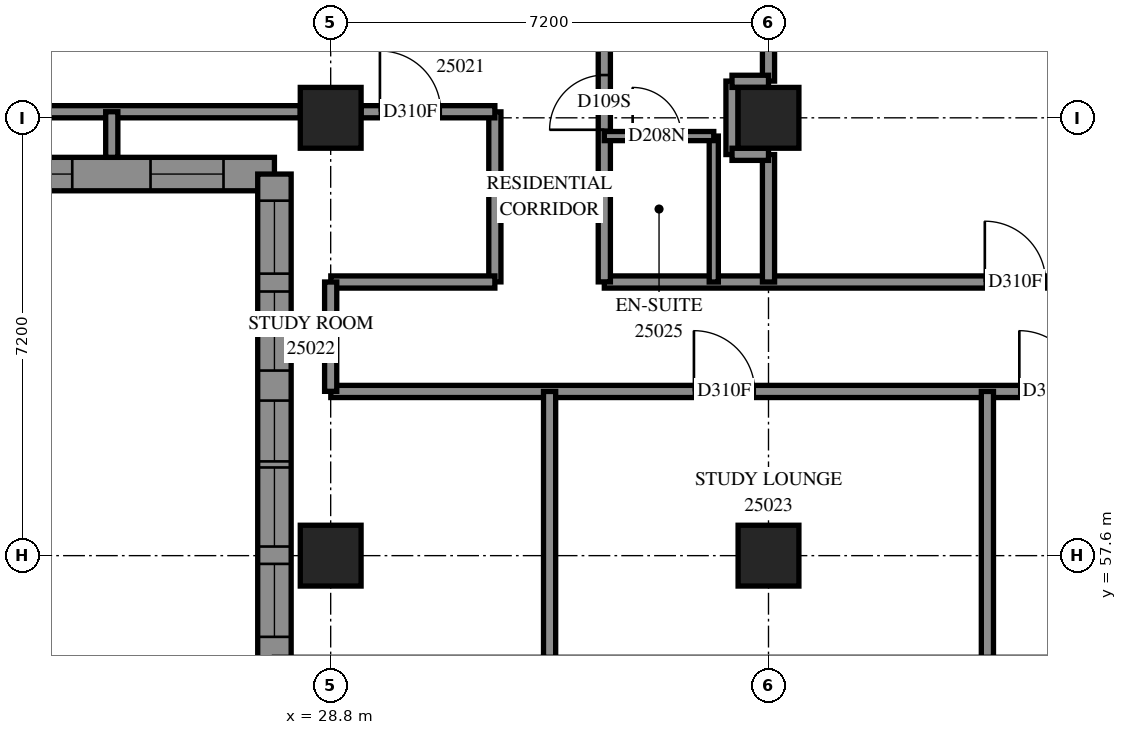
"""IFC4 building model, lengths in metres.
Left out: names, types, materials, properties, quantities, classifications, styles, units other than length and angle.
Written with IfcOpenShell. Run it as: python <this file> out.ifc"""

import sys

from ifc_helpers import new_model, si_unit, direction, frame, frame_2d, origin, origin_2d, place, context, subcontext, project, spatial, polyline, rectangle, outline, extrude, element, fill, save


model = new_model("IFC4")
c1 = context("Model", 3, precision=1e-05, world=origin(), true_north=direction((0.0, 1.0)))
c2 = subcontext(c1, "Body", "Model", "MODEL_VIEW")
j1 = project(units=[si_unit("LENGTHUNIT", "METRE"), si_unit("PLANEANGLEUNIT", "RADIAN")], contexts=[c1])
p1 = place(None, origin())
s1 = spatial("IfcSite", under=j1, at=p1, CompositionType="ELEMENT")
p2 = place(p1, origin())
s2 = spatial("IfcBuilding", under=s1, at=p2, CompositionType="ELEMENT")
p3 = place(p2, frame((0.0, 0.0, 94.8)))
s3 = spatial("IfcBuildingStorey", under=s2, at=p3, CompositionType="ELEMENT", Elevation=94.8)
for number, where, z_axis, x_axis in (
    (1, (28.8, 57.6, 0.0), (0.0, 0.0, 1.0), (1.0, 0.0, 0.0)),
    (2, (28.8, 64.8, 0.0), (0.0, 0.0, 1.0), (1.0, 0.0, 0.0)),
    (3, (36.0, 57.6, 0.0), (0.0, 0.0, 1.0), (1.0, 0.0, 0.0)),
    (4, (36.0, 64.8, 0.0), (0.0, 0.0, 1.0), (1.0, 0.0, 0.0)),
):
    element("IfcColumn", number, at=place(p3, frame(where, z_axis=z_axis, x_axis=x_axis)), inside=s3, PredefinedType="COLUMN", context=c2, shape_type="SweptSolid", body=[
        extrude(rectangle(XDim=1.0, YDim=1.0, at=origin_2d()), origin(), (0.0, 0.0, 1.0), 3.1),
    ])
p4 = place(p3, frame((19.654, 63.875, 0.0), z_axis=(0.0, 0.0, 1.0), x_axis=(1.0, 0.0, 0.0)))
e5 = element("IfcWall", 5, at=p4, inside=s3, PredefinedType="SOLIDWALL", context=c2, shape_type="SweptSolid", body=[
    extrude(outline(polyline([(-0.275, -0.275), (7.946, -0.275), (8.496, 0.275), (0.275, 0.275), (-0.275, -0.275)])), origin(), (0.0, 0.0, 1.0), 3.1),
])
p5 = place(p4, frame((2.096, 0.0, 0.5)))
e6 = element("IfcOpeningElement", 6, at=p5, cuts=e5, PredefinedType="OPENING", context=c2, shape_type="SweptSolid", body=[
    extrude(rectangle(XDim=1.3, YDim=2.45, at=frame_2d((0.65, 1.225))), frame((0.0, 0.285, 0.0), z_axis=(0.0, -1.0, 0.0), x_axis=(1.0, 0.0, 0.0)), (0.0, 0.0, 1.0), 0.57),
])
p6 = place(p4, frame((3.596, 0.0, 0.5)))
e7 = element("IfcOpeningElement", 7, at=p6, cuts=e5, PredefinedType="OPENING", context=c2, shape_type="SweptSolid", body=[
    extrude(rectangle(XDim=1.3, YDim=2.45, at=frame_2d((0.65, 1.225))), frame((0.0, 0.285, 0.0), z_axis=(0.0, -1.0, 0.0), x_axis=(1.0, 0.0, 0.0)), (0.0, 0.0, 1.0), 0.57),
])
p7 = place(p4, frame((0.611, 0.0, 0.5)))
e8 = element("IfcOpeningElement", 8, at=p7, cuts=e5, PredefinedType="OPENING", context=c2, shape_type="SweptSolid", body=[
    extrude(rectangle(XDim=1.2, YDim=2.45, at=frame_2d((0.6, 1.225))), frame((0.0, 0.285, 0.0), z_axis=(0.0, -1.0, 0.0), x_axis=(1.0, 0.0, 0.0)), (0.0, 0.0, 1.0), 0.57),
])
p8 = place(p4, frame((6.184, 0.0, 0.5)))
e9 = element("IfcOpeningElement", 9, at=p8, cuts=e5, PredefinedType="OPENING", context=c2, shape_type="SweptSolid", body=[
    extrude(rectangle(XDim=1.2, YDim=2.45, at=frame_2d((0.6, 1.225))), frame((0.0, 0.285, 0.0), z_axis=(0.0, -1.0, 0.0), x_axis=(1.0, 0.0, 0.0)), (0.0, 0.0, 1.0), 0.57),
])
p9 = place(p3, frame((27.875, 63.875, 0.0), z_axis=(0.0, 0.0, 1.0), x_axis=(0.0, -1.0, 0.0)))
e10 = element("IfcWall", 10, at=p9, inside=s3, PredefinedType="SOLIDWALL", context=c2, shape_type="SweptSolid", body=[
    extrude(outline(polyline([(0.275, -0.275), (8.496, -0.275), (7.946, 0.275), (-0.275, 0.275), (0.275, -0.275)])), origin(), (0.0, 0.0, 1.0), 3.1),
])
p10 = place(p9, frame((4.825, 0.0, 0.5)))
e11 = element("IfcOpeningElement", 11, at=p10, cuts=e10, PredefinedType="OPENING", context=c2, shape_type="SweptSolid", body=[
    extrude(rectangle(XDim=1.3, YDim=2.45, at=frame_2d((0.65, 1.225))), frame((0.0, 0.285, 0.0), z_axis=(0.0, -1.0, 0.0), x_axis=(1.0, 0.0, 0.0)), (0.0, 0.0, 1.0), 0.57),
])
p11 = place(p9, frame((0.438, 0.0, 0.5)))
e12 = element("IfcOpeningElement", 12, at=p11, cuts=e10, PredefinedType="OPENING", context=c2, shape_type="SweptSolid", body=[
    extrude(rectangle(XDim=1.2, YDim=2.45, at=frame_2d((0.6, 1.225))), frame((0.0, 0.285, 0.0), z_axis=(0.0, -1.0, 0.0), x_axis=(1.0, 0.0, 0.0)), (0.0, 0.0, 1.0), 0.57),
])
p12 = place(p9, frame((6.41, 0.0, 0.5)))
e13 = element("IfcOpeningElement", 13, at=p12, cuts=e10, PredefinedType="OPENING", context=c2, shape_type="SweptSolid", body=[
    extrude(rectangle(XDim=1.2, YDim=2.45, at=frame_2d((0.6, 1.225))), frame((0.0, 0.285, 0.0), z_axis=(0.0, -1.0, 0.0), x_axis=(1.0, 0.0, 0.0)), (0.0, 0.0, 1.0), 0.57),
])
p13 = place(p9, frame((1.931, 0.0, 0.5)))
e14 = element("IfcOpeningElement", 14, at=p13, cuts=e10, PredefinedType="OPENING", context=c2, shape_type="SweptSolid", body=[
    extrude(rectangle(XDim=1.3, YDim=2.45, at=frame_2d((0.65, 1.225))), frame((0.0, 0.285, 0.0), z_axis=(0.0, -1.0, 0.0), x_axis=(1.0, 0.0, 0.0)), (0.0, 0.0, 1.0), 0.57),
])
p14 = place(p9, frame((3.725, 0.0, 0.45)))
e15 = element("IfcOpeningElement", 15, at=p14, cuts=e10, PredefinedType="OPENING", context=c2, shape_type="SweptSolid", body=[
    extrude(rectangle(XDim=1.0, YDim=2.5, at=frame_2d((0.5, 1.25))), frame((0.0, 0.285, 0.0), z_axis=(0.0, -1.0, 0.0), x_axis=(1.0, 0.0, 0.0)), (0.0, 0.0, 1.0), 0.57),
])
p15 = place(p3, frame((28.802, 60.3, 0.0), z_axis=(0.0, 0.0, 1.0), x_axis=(1.0, 0.0, 0.0)))
e16 = element("IfcWall", 16, at=p15, inside=s3, PredefinedType="PARTITIONING", context=c2, shape_type="SweptSolid", body=[
    extrude(rectangle(XDim=24.298, YDim=0.2, at=frame_2d((12.149, 0.0))), origin(), (0.0, 0.0, 1.0), 3.1),
])
p16 = place(p15, frame((5.972, 0.0, 0.0)))
e17 = element("IfcOpeningElement", 17, at=p16, cuts=e16, PredefinedType="OPENING", context=c2, shape_type="SweptSolid", body=[
    extrude(rectangle(XDim=1.0, YDim=2.1, at=frame_2d((0.5, 1.05))), frame((0.0, 0.11, 0.0), z_axis=(0.0, -1.0, 0.0), x_axis=(1.0, 0.0, 0.0)), (0.0, 0.0, 1.0), 0.22),
])
p17 = place(p15, frame((11.323, 0.0, 0.0)))
e18 = element("IfcOpeningElement", 18, at=p17, cuts=e16, PredefinedType="OPENING", context=c2, shape_type="SweptSolid", body=[
    extrude(rectangle(XDim=1.0, YDim=2.1, at=frame_2d((0.5, 1.05))), frame((0.0, 0.11, 0.0), z_axis=(0.0, -1.0, 0.0), x_axis=(1.0, 0.0, 0.0)), (0.0, 0.0, 1.0), 0.22),
])
p18 = place(p15, frame((14.798, 0.0, 0.0)))
e19 = element("IfcOpeningElement", 19, at=p18, cuts=e16, PredefinedType="OPENING", context=c2, shape_type="SweptSolid", body=[
    extrude(rectangle(XDim=0.9, YDim=2.1, at=frame_2d((0.45, 1.05))), frame((0.0, 0.11, 0.0), z_axis=(0.0, -1.0, 0.0), x_axis=(1.0, 0.0, 0.0)), (0.0, 0.0, 1.0), 0.22),
])
p19 = place(p15, frame((18.833, 0.0, 0.0)))
e20 = element("IfcOpeningElement", 20, at=p19, cuts=e16, PredefinedType="OPENING", context=c2, shape_type="SweptSolid", body=[
    extrude(rectangle(XDim=1.0, YDim=2.1, at=frame_2d((0.5, 1.05))), frame((0.0, 0.11, 0.0), z_axis=(0.0, -1.0, 0.0), x_axis=(1.0, 0.0, 0.0)), (0.0, 0.0, 1.0), 0.22),
])
p20 = place(p15, frame((23.151, 0.0, 0.0)))
e21 = element("IfcOpeningElement", 21, at=p20, cuts=e16, PredefinedType="OPENING", context=c2, shape_type="SweptSolid", body=[
    extrude(rectangle(XDim=1.0, YDim=2.1, at=frame_2d((0.5, 1.05))), frame((0.0, 0.11, 0.0), z_axis=(0.0, -1.0, 0.0), x_axis=(1.0, 0.0, 0.0)), (0.0, 0.0, 1.0), 0.22),
])
p21 = place(p3, frame((33.3, 62.1, 0.0), z_axis=(0.0, 0.0, 1.0), x_axis=(1.0, 0.0, 0.0)))
e22 = element("IfcWall", 22, at=p21, inside=s3, PredefinedType="PARTITIONING", context=c2, shape_type="SweptSolid", body=[
    extrude(rectangle(XDim=17.1, YDim=0.2, at=frame_2d((8.55, 0.0))), origin(), (0.0, 0.0, 1.0), 3.1),
])
p22 = place(p21, frame((6.258, 0.0, 0.0)))
e23 = element("IfcOpeningElement", 23, at=p22, cuts=e22, PredefinedType="OPENING", context=c2, shape_type="SweptSolid", body=[
    extrude(rectangle(XDim=1.0, YDim=2.1, at=frame_2d((0.5, 1.05))), frame((0.0, 0.11, 0.0), z_axis=(0.0, -1.0, 0.0), x_axis=(1.0, 0.0, 0.0)), (0.0, 0.0, 1.0), 0.22),
])
p23 = place(p21, frame((10.148, 0.0, 0.0)))
e24 = element("IfcOpeningElement", 24, at=p23, cuts=e22, PredefinedType="OPENING", context=c2, shape_type="SweptSolid", body=[
    extrude(rectangle(XDim=0.9, YDim=2.1, at=frame_2d((0.45, 1.05))), frame((0.0, 0.11, 0.0), z_axis=(0.0, -1.0, 0.0), x_axis=(1.0, 0.0, 0.0)), (0.0, 0.0, 1.0), 0.22),
])
p24 = place(p21, frame((15.729, 0.0, 0.0)))
e25 = element("IfcOpeningElement", 25, at=p24, cuts=e22, PredefinedType="OPENING", context=c2, shape_type="SweptSolid", body=[
    extrude(rectangle(XDim=0.9, YDim=2.1, at=frame_2d((0.45, 1.05))), frame((0.0, 0.11, 0.0), z_axis=(0.0, -1.0, 0.0), x_axis=(1.0, 0.0, 0.0)), (0.0, 0.0, 1.0), 0.22),
])
p25 = place(p3, frame((22.1, 64.9, 0.0), z_axis=(0.0, 0.0, 1.0), x_axis=(1.0, 0.0, 0.0)))
e26 = element("IfcWall", 26, at=p25, inside=s3, PredefinedType="PARTITIONING", context=c2, shape_type="SweptSolid", body=[
    extrude(rectangle(XDim=6.2, YDim=0.2, at=frame_2d((3.1, 0.0))), origin(), (0.0, 0.0, 1.0), 2.6),
])
p26 = place(p3, frame((36.0, 65.404, 0.0), z_axis=(0.0, 0.0, 1.0), x_axis=(0.0, 1.0, 0.0)))
e27 = element("IfcWall", 27, at=p26, inside=s3, PredefinedType="PARTITIONING", context=c2, shape_type="SweptSolid", body=[
    extrude(rectangle(XDim=5.992, YDim=0.2, at=frame_2d((2.996, 0.0))), origin(), (0.0, 0.0, 1.0), 3.1),
])
p27 = place(p3, frame((33.3, 62.102, 0.0), z_axis=(0.0, 0.0, 1.0), x_axis=(0.0, 1.0, 0.0)))
e28 = element("IfcWall", 28, at=p27, inside=s3, PredefinedType="PARTITIONING", context=c2, shape_type="SweptSolid", body=[
    extrude(rectangle(XDim=4.598, YDim=0.2, at=frame_2d((2.299, 0.0))), origin(), (0.0, 0.0, 1.0), 3.1),
])
p28 = place(p27, frame((2.501, 0.0, 0.0)))
e29 = element("IfcOpeningElement", 29, at=p28, cuts=e28, PredefinedType="OPENING", context=c2, shape_type="SweptSolid", body=[
    extrude(rectangle(XDim=0.9, YDim=2.1, at=frame_2d((0.45, 1.05))), frame((0.0, 0.11, 0.0), z_axis=(0.0, -1.0, 0.0), x_axis=(1.0, 0.0, 0.0)), (0.0, 0.0, 1.0), 0.22),
])
for number, where, z_axis, x_axis in (
    (30, (32.4, 55.929, 0.0), (0.0, 0.0, 1.0), (0.0, 1.0, 0.0)),
    (31, (39.6, 55.929, 0.0), (0.0, 0.0, 1.0), (0.0, 1.0, 0.0)),
):
    element("IfcWall", number, at=place(p3, frame(where, z_axis=z_axis, x_axis=x_axis)), inside=s3, PredefinedType="PARTITIONING", context=c2, shape_type="SweptSolid", body=[
        extrude(rectangle(XDim=4.371, YDim=0.2, at=frame_2d((2.186, 0.0))), origin(), (0.0, 0.0, 1.0), 3.1),
    ])
p29 = place(p3, frame((31.5, 62.102, 0.0), z_axis=(0.0, 0.0, 1.0), x_axis=(0.0, 1.0, 0.0)))
e32 = element("IfcWall", 32, at=p29, inside=s3, PredefinedType="PARTITIONING", context=c2, shape_type="SweptSolid", body=[
    extrude(rectangle(XDim=2.796, YDim=0.2, at=frame_2d((1.398, 0.0))), origin(), (0.0, 0.0, 1.0), 3.1),
])
p30 = place(p3, frame((28.802, 62.1, 0.0), z_axis=(0.0, 0.0, 1.0), x_axis=(1.0, 0.0, 0.0)))
e33 = element("IfcWall", 33, at=p30, inside=s3, PredefinedType="PARTITIONING", context=c2, shape_type="SweptSolid", body=[
    extrude(rectangle(XDim=2.698, YDim=0.2, at=frame_2d((1.349, 0.0))), origin(), (0.0, 0.0, 1.0), 3.1),
])
p31 = place(p3, frame((35.1, 62.1, 0.0), z_axis=(0.0, 0.0, 1.0), x_axis=(0.0, 1.0, 0.0)))
e34 = element("IfcWall", 34, at=p31, inside=s3, PredefinedType="PARTITIONING", context=c2, shape_type="SweptSolid", body=[
    extrude(rectangle(XDim=2.4, YDim=0.15, at=frame_2d((1.2, 0.0))), origin(), (0.0, 0.0, 1.0), 3.1),
])
p32 = place(p3, frame((29.3, 64.9, 0.0), z_axis=(0.0, 0.0, 1.0), x_axis=(1.0, 0.0, 0.0)))
e35 = element("IfcWall", 35, at=p32, inside=s3, PredefinedType="PARTITIONING", context=c2, shape_type="SweptSolid", body=[
    extrude(rectangle(XDim=2.2, YDim=0.2, at=frame_2d((1.1, 0.0))), origin(), (0.0, 0.0, 1.0), 3.1),
])
p33 = place(p32, frame((0.31, 0.0, 0.0)))
e36 = element("IfcOpeningElement", 36, at=p33, cuts=e35, PredefinedType="OPENING", context=c2, shape_type="SweptSolid", body=[
    extrude(rectangle(XDim=1.0, YDim=2.1, at=frame_2d((0.5, 1.05))), frame((0.0, 0.11, 0.0), z_axis=(0.0, -1.0, 0.0), x_axis=(1.0, 0.0, 0.0)), (0.0, 0.0, 1.0), 0.22),
])
p34 = place(p3, frame((36.0, 62.1, 0.0), z_axis=(0.0, 0.0, 1.0), x_axis=(0.0, 1.0, 0.0)))
e37 = element("IfcWall", 37, at=p34, inside=s3, PredefinedType="PARTITIONING", context=c2, shape_type="SweptSolid", body=[
    extrude(rectangle(XDim=2.096, YDim=0.2, at=frame_2d((1.048, 0.0))), origin(), (0.0, 0.0, 1.0), 3.1),
])
p35 = place(p3, frame((33.3, 64.5, 0.0), z_axis=(0.0, 0.0, 1.0), x_axis=(1.0, 0.0, 0.0)))
e38 = element("IfcWall", 38, at=p35, inside=s3, PredefinedType="PARTITIONING", context=c2, shape_type="SweptSolid", body=[
    extrude(rectangle(XDim=1.8, YDim=0.15, at=frame_2d((0.9, 0.0))), origin(), (0.0, 0.0, 1.0), 3.1),
])
p36 = place(p35, frame((0.466, 0.0, 0.0)))
e39 = element("IfcOpeningElement", 39, at=p36, cuts=e38, PredefinedType="OPENING", context=c2, shape_type="SweptSolid", body=[
    extrude(rectangle(XDim=0.8, YDim=2.1, at=frame_2d((0.4, 1.05))), frame((0.0, 0.085, 0.0), z_axis=(0.0, -1.0, 0.0), x_axis=(1.0, 0.0, 0.0)), (0.0, 0.0, 1.0), 0.17),
])
p37 = place(p3, frame((28.8, 60.302, 0.0), z_axis=(0.0, 0.0, 1.0), x_axis=(0.0, 1.0, 0.0)))
e40 = element("IfcWall", 40, at=p37, inside=s3, PredefinedType="PARTITIONING", context=c2, shape_type="SweptSolid", body=[
    extrude(rectangle(XDim=1.798, YDim=0.2, at=frame_2d((0.899, 0.0))), origin(), (0.0, 0.0, 1.0), 2.6),
])
p38 = place(p3, frame((35.4, 64.196, 0.0), z_axis=(0.0, 0.0, 1.0), x_axis=(0.0, 1.0, 0.0)))
e41 = element("IfcWall", 41, at=p38, inside=s3, PredefinedType="PARTITIONING", context=c2, shape_type="SweptSolid", body=[
    extrude(rectangle(XDim=1.208, YDim=0.2, at=frame_2d((0.604, 0.0))), origin(), (0.0, 0.0, 1.0), 3.1),
])
p39 = place(p3, frame((25.2, 64.15, 0.0), z_axis=(0.0, 0.0, 1.0), x_axis=(0.0, 1.0, 0.0)))
e42 = element("IfcWall", 42, at=p39, inside=s3, PredefinedType="PARTITIONING", context=c2, shape_type="SweptSolid", body=[
    extrude(rectangle(XDim=0.75, YDim=0.2, at=frame_2d((0.375, 0.0))), origin(), (0.0, 0.0, 1.0), 3.1),
])
for number, where, z_axis, x_axis in (
    (43, (35.4, 65.4, 0.0), (0.0, 0.0, 1.0), (1.0, 0.0, 0.0)),
    (44, (35.4, 64.2, 0.0), (0.0, 0.0, 1.0), (1.0, 0.0, 0.0)),
):
    element("IfcWall", number, at=place(p3, frame(where, z_axis=z_axis, x_axis=x_axis)), inside=s3, PredefinedType="PARTITIONING", context=c2, shape_type="SweptSolid", body=[
        extrude(rectangle(XDim=0.6, YDim=0.2, at=frame_2d((0.3, 0.0))), origin(), (0.0, 0.0, 1.0), 3.1),
    ])
p40 = place(p6, origin())
e45 = element("IfcWindow", 45, at=p40, inside=s3, PartitioningType="SINGLE_PANEL", PredefinedType="WINDOW", context=c2, shape_type="SweptSolid", body=[
    extrude(rectangle(XDim=1.3, YDim=2.45, at=frame_2d((0.65, 1.225))), frame((0.0, 0.155, 0.0), z_axis=(0.0, -1.0, 0.0), x_axis=(1.0, 0.0, 0.0)), (0.0, 0.0, 1.0), 0.06),
])
fill(e7, e45)
p41 = place(p8, origin())
e46 = element("IfcWindow", 46, at=p41, inside=s3, PartitioningType="SINGLE_PANEL", PredefinedType="WINDOW", context=c2, shape_type="SweptSolid", body=[
    extrude(rectangle(XDim=1.2, YDim=2.45, at=frame_2d((0.6, 1.225))), frame((0.0, 0.155, 0.0), z_axis=(0.0, -1.0, 0.0), x_axis=(1.0, 0.0, 0.0)), (0.0, 0.0, 1.0), 0.06),
])
fill(e9, e46)
p42 = place(p10, origin())
e47 = element("IfcWindow", 47, at=p42, inside=s3, PartitioningType="SINGLE_PANEL", PredefinedType="WINDOW", context=c2, shape_type="SweptSolid", body=[
    extrude(rectangle(XDim=1.3, YDim=2.45, at=frame_2d((0.65, 1.225))), frame((0.0, 0.155, 0.0), z_axis=(0.0, -1.0, 0.0), x_axis=(1.0, 0.0, 0.0)), (0.0, 0.0, 1.0), 0.06),
])
fill(e11, e47)
p43 = place(p11, origin())
e48 = element("IfcWindow", 48, at=p43, inside=s3, PartitioningType="SINGLE_PANEL", PredefinedType="WINDOW", context=c2, shape_type="SweptSolid", body=[
    extrude(rectangle(XDim=1.2, YDim=2.45, at=frame_2d((0.6, 1.225))), frame((0.0, 0.155, 0.0), z_axis=(0.0, -1.0, 0.0), x_axis=(1.0, 0.0, 0.0)), (0.0, 0.0, 1.0), 0.06),
])
fill(e12, e48)
p44 = place(p12, origin())
e49 = element("IfcWindow", 49, at=p44, inside=s3, PartitioningType="SINGLE_PANEL", PredefinedType="WINDOW", context=c2, shape_type="SweptSolid", body=[
    extrude(rectangle(XDim=1.2, YDim=2.45, at=frame_2d((0.6, 1.225))), frame((0.0, 0.155, 0.0), z_axis=(0.0, -1.0, 0.0), x_axis=(1.0, 0.0, 0.0)), (0.0, 0.0, 1.0), 0.06),
])
fill(e13, e49)
p45 = place(p33, origin())
e50 = element("IfcDoor", 50, at=p45, inside=s3, OperationType="SINGLE_SWING_RIGHT", PredefinedType="DOOR", context=c2, shape_type="SweptSolid", body=[
    extrude(rectangle(XDim=1.0, YDim=2.1, at=frame_2d((0.5, 1.05))), frame((0.0, 0.025, 0.0), z_axis=(0.0, -1.0, 0.0), x_axis=(1.0, 0.0, 0.0)), (0.0, 0.0, 1.0), 0.05),
])
fill(e36, e50)
p46 = place(p16, origin())
e51 = element("IfcDoor", 51, at=p46, inside=s3, OperationType="SINGLE_SWING_RIGHT", PredefinedType="DOOR", context=c2, shape_type="SweptSolid", body=[
    extrude(rectangle(XDim=1.0, YDim=2.1, at=frame_2d((0.5, 1.05))), frame((0.0, 0.025, 0.0), z_axis=(0.0, -1.0, 0.0), x_axis=(1.0, 0.0, 0.0)), (0.0, 0.0, 1.0), 0.05),
])
fill(e17, e51)
p47 = place(p28, origin())
e52 = element("IfcDoor", 52, at=p47, inside=s3, OperationType="SINGLE_SWING_LEFT", PredefinedType="DOOR", context=c2, shape_type="SweptSolid", body=[
    extrude(rectangle(XDim=0.9, YDim=2.1, at=frame_2d((0.45, 1.05))), frame((0.0, 0.025, 0.0), z_axis=(0.0, -1.0, 0.0), x_axis=(1.0, 0.0, 0.0)), (0.0, 0.0, 1.0), 0.05),
])
fill(e29, e52)
p48 = place(p36, origin())
e53 = element("IfcDoor", 53, at=p48, inside=s3, OperationType="SINGLE_SWING_RIGHT", PredefinedType="DOOR", context=c2, shape_type="SweptSolid", body=[
    extrude(rectangle(XDim=0.8, YDim=2.1, at=frame_2d((0.4, 1.05))), frame((0.0, 0.025, 0.0), z_axis=(0.0, -1.0, 0.0), x_axis=(1.0, 0.0, 0.0)), (0.0, 0.0, 1.0), 0.05),
])
fill(e39, e53)
p49 = place(p22, origin())
e54 = element("IfcDoor", 54, at=p49, inside=s3, OperationType="SINGLE_SWING_RIGHT", PredefinedType="DOOR", context=c2, shape_type="SweptSolid", body=[
    extrude(rectangle(XDim=1.0, YDim=2.1, at=frame_2d((0.5, 1.05))), frame((0.0, 0.025, 0.0), z_axis=(0.0, -1.0, 0.0), x_axis=(1.0, 0.0, 0.0)), (0.0, 0.0, 1.0), 0.05),
])
fill(e23, e54)
p50 = place(p17, origin())
e55 = element("IfcDoor", 55, at=p50, inside=s3, OperationType="SINGLE_SWING_RIGHT", PredefinedType="DOOR", context=c2, shape_type="SweptSolid", body=[
    extrude(rectangle(XDim=1.0, YDim=2.1, at=frame_2d((0.5, 1.05))), frame((0.0, 0.025, 0.0), z_axis=(0.0, -1.0, 0.0), x_axis=(1.0, 0.0, 0.0)), (0.0, 0.0, 1.0), 0.05),
])
fill(e18, e55)
p51 = place(p13, origin())
e56 = element("IfcWindow", 56, at=p51, inside=s3, PartitioningType="SINGLE_PANEL", PredefinedType="WINDOW", context=c2, shape_type="SweptSolid", body=[
    extrude(rectangle(XDim=1.3, YDim=2.45, at=frame_2d((0.65, 1.225))), frame((0.0, 0.155, 0.0), z_axis=(0.0, -1.0, 0.0), x_axis=(1.0, 0.0, 0.0)), (0.0, 0.0, 1.0), 0.06),
])
fill(e14, e56)
p52 = place(p14, origin())
e57 = element("IfcWindow", 57, at=p52, inside=s3, PartitioningType="SINGLE_PANEL", PredefinedType="WINDOW", context=c2, shape_type="SweptSolid", body=[
    extrude(rectangle(XDim=1.0, YDim=2.5, at=frame_2d((0.5, 1.25))), frame((0.0, 0.155, 0.0), z_axis=(0.0, -1.0, 0.0), x_axis=(1.0, 0.0, 0.0)), (0.0, 0.0, 1.0), 0.06),
])
fill(e15, e57)
save(model, sys.argv[1])
